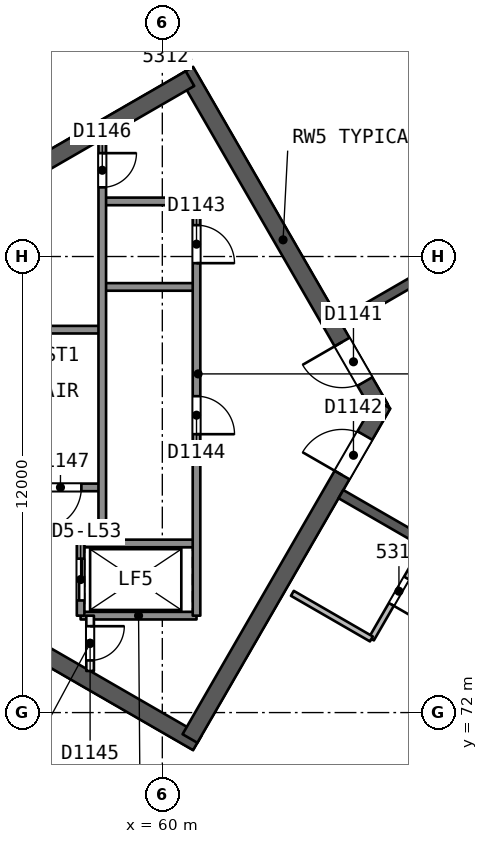
"""IFC4 building model, lengths in metres.
Left out: names, types, materials, properties, quantities, classifications, styles, units other than length and angle.
Written with IfcOpenShell. Run it as: python <this file> out.ifc"""

import sys

from ifc_helpers import new_model, si_unit, direction, frame, frame_2d, origin, place, context, subcontext, project, spatial, rectangle, extrude, element, fill, save


model = new_model("IFC4")
c1 = context("Model", 3, precision=1e-05, world=origin(), true_north=direction((0.0, 1.0)))
c2 = subcontext(c1, "Body", "Model", "MODEL_VIEW")
j1 = project(units=[si_unit("LENGTHUNIT", "METRE"), si_unit("PLANEANGLEUNIT", "RADIAN")], contexts=[c1])
p1 = place(None, origin())
s1 = spatial("IfcSite", under=j1, at=p1, CompositionType="ELEMENT")
p2 = place(p1, origin())
s2 = spatial("IfcBuilding", under=s1, at=p2, CompositionType="ELEMENT")
p3 = place(p2, frame((0.0, 0.0, 216.9)))
s3 = spatial("IfcBuildingStorey", under=s2, at=p3, CompositionType="ELEMENT", Elevation=216.9)
p4 = place(p3, frame((65.74, 80.0, 0.0), z_axis=(0.0, 0.0, 1.0), x_axis=(-0.499991857942, 0.866030104553, 0.0)))
e1 = element("IfcWall", 1, at=p4, inside=s3, PredefinedType="SHEAR", context=c2, shape_type="SweptSolid", body=[
    extrude(rectangle(XDim=10.25, YDim=0.45, at=frame_2d((5.125, 0.0))), origin(), (0.0, 0.0, 1.0), 3.7),
])
p5 = place(p4, frame((0.82, 0.0, 0.0)))
e2 = element("IfcOpeningElement", 2, at=p5, cuts=e1, PredefinedType="OPENING", context=c2, shape_type="SweptSolid", body=[
    extrude(rectangle(XDim=1.2, YDim=2.1, at=frame_2d((0.6, 1.05))), frame((0.0, 0.235, 0.0), z_axis=(0.0, -1.0, 0.0), x_axis=(1.0, 0.0, 0.0)), (0.0, 0.0, 1.0), 0.471),
])
p6 = place(p3, frame((60.728, 88.682, 0.0), z_axis=(0.0, 0.0, 1.0), x_axis=(-0.866021613849, -0.500006564303, 0.0)))
e3 = element("IfcWall", 3, at=p6, inside=s3, PredefinedType="SHEAR", context=c2, shape_type="SweptSolid", body=[
    extrude(rectangle(XDim=14.108, YDim=0.45, at=frame_2d((7.054, 0.0))), origin(), (0.0, 0.0, 1.0), 3.7),
])
p7 = place(p3, frame((48.622, 78.307, 0.0), z_axis=(0.0, 0.0, 1.0), x_axis=(0.86602701116, -0.499997215934, 0.0)))
e4 = element("IfcWall", 4, at=p7, inside=s3, PredefinedType="SHEAR", context=c2, shape_type="SweptSolid", body=[
    extrude(rectangle(XDim=14.204, YDim=0.45, at=frame_2d((7.102, 0.0))), origin(), (0.0, 0.0, 1.0), 3.7),
])
p8 = place(p3, frame((60.728, 71.318, 0.0), z_axis=(0.0, 0.0, 1.0), x_axis=(0.500012416173, 0.866018235185, 0.0)))
e5 = element("IfcWall", 5, at=p8, inside=s3, PredefinedType="SHEAR", context=c2, shape_type="SweptSolid", body=[
    extrude(rectangle(XDim=10.155, YDim=0.45, at=frame_2d((5.078, 0.0))), origin(), (0.0, 0.0, 1.0), 3.7),
])
p9 = place(p8, frame((8.005, 0.0, 0.0)))
e6 = element("IfcOpeningElement", 6, at=p9, cuts=e5, PredefinedType="OPENING", context=c2, shape_type="SweptSolid", body=[
    extrude(rectangle(XDim=1.2, YDim=2.1, at=frame_2d((0.6, 1.05))), frame((0.0, 0.235, 0.0), z_axis=(0.0, -1.0, 0.0), x_axis=(1.0, 0.0, 0.0)), (0.0, 0.0, 1.0), 0.471),
])
p10 = place(p3, frame((78.2, 90.046, 0.0), z_axis=(0.0, 0.0, 1.0), x_axis=(-0.866026492143, -0.499998114903, 0.0)))
e7 = element("IfcWall", 7, at=p10, inside=s3, PredefinedType="SHEAR", context=c2, shape_type="SweptSolid", body=[
    extrude(rectangle(XDim=15.588, YDim=0.25, at=frame_2d((7.794, 0.0))), origin(), (0.0, 0.0, 1.0), 3.3),
])
p11 = place(p10, frame((2.462, 0.0, 0.0)))
e8 = element("IfcOpeningElement", 8, at=p11, cuts=e7, PredefinedType="OPENING", context=c2, shape_type="SweptSolid", body=[
    extrude(rectangle(XDim=1.0, YDim=2.1, at=frame_2d((0.5, 1.05))), frame((0.0, 0.135, 0.0), z_axis=(0.0, -1.0, 0.0), x_axis=(1.0, 0.0, 0.0)), (0.0, 0.0, 1.0), 0.271),
])
p12 = place(p10, frame((8.003, 0.0, 0.0)))
e9 = element("IfcOpeningElement", 9, at=p12, cuts=e7, PredefinedType="OPENING", context=c2, shape_type="SweptSolid", body=[
    extrude(rectangle(XDim=1.1, YDim=2.1, at=frame_2d((0.55, 1.05))), frame((0.0, 0.135, 0.0), z_axis=(0.0, -1.0, 0.0), x_axis=(1.0, 0.0, 0.0)), (0.0, 0.0, 1.0), 0.271),
])
p13 = place(p10, frame((11.971, 0.0, 0.0)))
e10 = element("IfcOpeningElement", 10, at=p13, cuts=e7, PredefinedType="OPENING", context=c2, shape_type="SweptSolid", body=[
    extrude(rectangle(XDim=1.0, YDim=2.1, at=frame_2d((0.5, 1.05))), frame((0.0, 0.135, 0.0), z_axis=(0.0, -1.0, 0.0), x_axis=(1.0, 0.0, 0.0)), (0.0, 0.0, 1.0), 0.271),
])
p14 = place(p3, frame((64.7, 77.748, 0.0), z_axis=(0.0, 0.0, 1.0), x_axis=(0.866026492143, -0.499998114903, 0.0)))
e11 = element("IfcWall", 11, at=p14, inside=s3, PredefinedType="SHEAR", context=c2, shape_type="SweptSolid", body=[
    extrude(rectangle(XDim=15.588, YDim=0.25, at=frame_2d((7.794, 0.0))), origin(), (0.0, 0.0, 1.0), 3.3),
])
p15 = place(p14, frame((3.45, 0.0, 0.0)))
e12 = element("IfcOpeningElement", 12, at=p15, cuts=e11, PredefinedType="OPENING", context=c2, shape_type="SweptSolid", body=[
    extrude(rectangle(XDim=1.0, YDim=2.1, at=frame_2d((0.5, 1.05))), frame((0.0, 0.135, 0.0), z_axis=(0.0, -1.0, 0.0), x_axis=(1.0, 0.0, 0.0)), (0.0, 0.0, 1.0), 0.271),
])
p16 = place(p14, frame((8.003, 0.0, 0.0)))
e13 = element("IfcOpeningElement", 13, at=p16, cuts=e11, PredefinedType="OPENING", context=c2, shape_type="SweptSolid", body=[
    extrude(rectangle(XDim=1.1, YDim=2.1, at=frame_2d((0.55, 1.05))), frame((0.0, 0.135, 0.0), z_axis=(0.0, -1.0, 0.0), x_axis=(1.0, 0.0, 0.0)), (0.0, 0.0, 1.0), 0.271),
])
p17 = place(p14, frame((11.971, 0.0, 0.0)))
e14 = element("IfcOpeningElement", 14, at=p17, cuts=e11, PredefinedType="OPENING", context=c2, shape_type="SweptSolid", body=[
    extrude(rectangle(XDim=1.0, YDim=2.1, at=frame_2d((0.5, 1.05))), frame((0.0, 0.135, 0.0), z_axis=(0.0, -1.0, 0.0), x_axis=(1.0, 0.0, 0.0)), (0.0, 0.0, 1.0), 0.271),
])
p18 = place(p3, frame((64.861, 94.443, 0.0), z_axis=(0.0, 0.0, 1.0), x_axis=(0.500010879287, -0.866019122534, 0.0)))
e15 = element("IfcWall", 15, at=p18, inside=s3, PredefinedType="PARTITIONING", context=c2, shape_type="SweptSolid", body=[
    extrude(rectangle(XDim=10.478, YDim=0.2, at=frame_2d((5.239, 0.0))), origin(), (0.0, 0.0, 1.0), 3.3),
])
p19 = place(p3, frame((59.461, 91.326, 0.0), z_axis=(0.0, 0.0, 1.0), x_axis=(0.499953629774, -0.866052173992, 0.0)))
e16 = element("IfcWall", 16, at=p19, inside=s3, PredefinedType="PARTITIONING", context=c2, shape_type="SweptSolid", body=[
    extrude(rectangle(XDim=2.499, YDim=0.1, at=frame_2d((1.25, 0.0))), origin(), (0.0, 0.0, 1.0), 3.3),
])
p20 = place(p19, frame((0.799, 0.0, 0.0)))
e17 = element("IfcOpeningElement", 17, at=p20, cuts=e16, PredefinedType="OPENING", context=c2, shape_type="SweptSolid", body=[
    extrude(rectangle(XDim=0.9, YDim=2.1, at=frame_2d((0.45, 1.05))), frame((0.0, 0.061, 0.0), z_axis=(0.0, -1.0, 0.0), x_axis=(1.0, 0.0, 0.0)), (0.0, 0.0, 1.0), 0.121),
])
p21 = place(p3, frame((66.952, 76.448, 0.0), z_axis=(0.0, 0.0, 1.0), x_axis=(-0.499987231761, -0.866032775405, 0.0)))
e18 = element("IfcWall", 18, at=p21, inside=s3, PredefinedType="PARTITIONING", context=c2, shape_type="SweptSolid", body=[
    extrude(rectangle(XDim=2.9, YDim=0.15, at=frame_2d((1.45, 0.0))), origin(), (0.0, 0.0, 1.0), 3.3),
])
p22 = place(p21, frame((1.05, 0.0, 0.0)))
e19 = element("IfcOpeningElement", 19, at=p22, cuts=e18, PredefinedType="OPENING", context=c2, shape_type="SweptSolid", body=[
    extrude(rectangle(XDim=0.8, YDim=2.1, at=frame_2d((0.4, 1.05))), frame((0.0, 0.085, 0.0), z_axis=(0.0, -1.0, 0.0), x_axis=(1.0, 0.0, 0.0)), (0.0, 0.0, 1.0), 0.171),
])
p23 = place(p3, frame((65.502, 73.937, 0.0), z_axis=(0.0, 0.0, 1.0), x_axis=(-0.865994240961, 0.500053971709, 0.0)))
e20 = element("IfcWall", 20, at=p23, inside=s3, PredefinedType="PARTITIONING", context=c2, shape_type="SweptSolid", body=[
    extrude(rectangle(XDim=2.401, YDim=0.15, at=frame_2d((1.201, 0.0))), origin(), (0.0, 0.0, 1.0), 3.3),
])
p24 = place(p3, frame((64.051, 66.024, 0.0), z_axis=(0.0, 0.0, 1.0), x_axis=(0.499980616072, 0.866036594811, 0.0)))
e21 = element("IfcWall", 21, at=p24, inside=s3, PredefinedType="PARTITIONING", context=c2, shape_type="SweptSolid", body=[
    extrude(rectangle(XDim=6.931, YDim=0.2, at=frame_2d((3.465, 0.0))), origin(), (0.0, 0.0, 1.0), 3.3),
])
p25 = place(p3, frame((44.063, 82.607, 0.0), z_axis=(0.0, 0.0, 1.0), x_axis=(0.866024402399, 0.500001734447, 0.0)))
e22 = element("IfcWall", 22, at=p25, inside=s3, PredefinedType="SOLIDWALL", context=c2, shape_type="SweptSolid", body=[
    extrude(rectangle(XDim=50.977, YDim=0.3, at=frame_2d((25.488, 0.0))), origin(), (0.0, 0.0, 1.0), 3.3),
])
p26 = place(p25, frame((24.444, 0.0, 0.0)))
e23 = element("IfcOpeningElement", 23, at=p26, cuts=e22, PredefinedType="OPENING", context=c2, shape_type="SweptSolid", body=[
    extrude(rectangle(XDim=2.4, YDim=2.4, at=frame_2d((1.2, 1.2))), frame((0.0, 0.161, 0.0), z_axis=(0.0, -1.0, 0.0), x_axis=(1.0, 0.0, 0.0)), (0.0, 0.0, 1.0), 0.321),
])
p27 = place(p25, frame((29.121, 0.0, 0.0)))
e24 = element("IfcOpeningElement", 24, at=p27, cuts=e22, PredefinedType="OPENING", context=c2, shape_type="SweptSolid", body=[
    extrude(rectangle(XDim=2.4, YDim=2.4, at=frame_2d((1.2, 1.2))), frame((0.0, 0.161, 0.0), z_axis=(0.0, -1.0, 0.0), x_axis=(1.0, 0.0, 0.0)), (0.0, 0.0, 1.0), 0.321),
])
p28 = place(p25, frame((39.656, 0.0, 0.0)))
e25 = element("IfcOpeningElement", 25, at=p28, cuts=e22, PredefinedType="OPENING", context=c2, shape_type="SweptSolid", body=[
    extrude(rectangle(XDim=2.4, YDim=2.4, at=frame_2d((1.2, 1.2))), frame((0.0, 0.161, 0.0), z_axis=(0.0, -1.0, 0.0), x_axis=(1.0, 0.0, 0.0)), (0.0, 0.0, 1.0), 0.321),
])
p29 = place(p25, frame((19.612, 0.0, 0.0)))
e26 = element("IfcOpeningElement", 26, at=p29, cuts=e22, PredefinedType="OPENING", context=c2, shape_type="SweptSolid", body=[
    extrude(rectangle(XDim=2.4, YDim=2.4, at=frame_2d((1.2, 1.2))), frame((0.0, 0.161, 0.0), z_axis=(0.0, -1.0, 0.0), x_axis=(1.0, 0.0, 0.0)), (0.0, 0.0, 1.0), 0.321),
])
p30 = place(p25, frame((8.885, 0.0, 0.0)))
e27 = element("IfcOpeningElement", 27, at=p30, cuts=e22, PredefinedType="OPENING", context=c2, shape_type="SweptSolid", body=[
    extrude(rectangle(XDim=2.4, YDim=2.4, at=frame_2d((1.2, 1.2))), frame((0.0, 0.161, 0.0), z_axis=(0.0, -1.0, 0.0), x_axis=(1.0, 0.0, 0.0)), (0.0, 0.0, 1.0), 0.321),
])
p31 = place(p3, frame((88.21, 51.904, 0.0), z_axis=(0.0, 0.0, 1.0), x_axis=(-0.866024402399, 0.500001734447, 0.0)))
e28 = element("IfcWall", 28, at=p31, inside=s3, PredefinedType="SOLIDWALL", context=c2, shape_type="SweptSolid", body=[
    extrude(rectangle(XDim=50.977, YDim=0.3, at=frame_2d((25.488, 0.0))), origin(), (0.0, 0.0, 1.0), 3.3),
])
p32 = place(p31, frame((24.756, 0.0, 0.0)))
e29 = element("IfcOpeningElement", 29, at=p32, cuts=e28, PredefinedType="OPENING", context=c2, shape_type="SweptSolid", body=[
    extrude(rectangle(XDim=2.4, YDim=2.4, at=frame_2d((1.2, 1.2))), frame((0.0, 0.161, 0.0), z_axis=(0.0, -1.0, 0.0), x_axis=(1.0, 0.0, 0.0)), (0.0, 0.0, 1.0), 0.321),
])
p33 = place(p31, frame((19.612, 0.0, 0.0)))
e30 = element("IfcOpeningElement", 30, at=p33, cuts=e28, PredefinedType="OPENING", context=c2, shape_type="SweptSolid", body=[
    extrude(rectangle(XDim=2.4, YDim=2.4, at=frame_2d((1.2, 1.2))), frame((0.0, 0.161, 0.0), z_axis=(0.0, -1.0, 0.0), x_axis=(1.0, 0.0, 0.0)), (0.0, 0.0, 1.0), 0.321),
])
p34 = place(p31, frame((8.885, 0.0, 0.0)))
e31 = element("IfcOpeningElement", 31, at=p34, cuts=e28, PredefinedType="OPENING", context=c2, shape_type="SweptSolid", body=[
    extrude(rectangle(XDim=2.4, YDim=2.4, at=frame_2d((1.2, 1.2))), frame((0.0, 0.161, 0.0), z_axis=(0.0, -1.0, 0.0), x_axis=(1.0, 0.0, 0.0)), (0.0, 0.0, 1.0), 0.321),
])
p35 = place(p31, frame((38.323, 0.0, 0.0)))
e32 = element("IfcOpeningElement", 32, at=p35, cuts=e28, PredefinedType="OPENING", context=c2, shape_type="SweptSolid", body=[
    extrude(rectangle(XDim=2.4, YDim=2.4, at=frame_2d((1.2, 1.2))), frame((0.0, 0.161, 0.0), z_axis=(0.0, -1.0, 0.0), x_axis=(1.0, 0.0, 0.0)), (0.0, 0.0, 1.0), 0.321),
])
for number, where, z_axis, x_axis in (
    (33, (60.9, 85.45, 0.0), (0.0, 0.0, 1.0), (-1.0, 0.0, 0.0)),
    (34, (60.9, 83.2, 0.0), (0.0, 0.0, 1.0), (-1.0, 0.0, 0.0)),
):
    element("IfcWall", number, at=place(p3, frame(where, z_axis=z_axis, x_axis=x_axis)), inside=s3, PredefinedType="SOLIDWALL", context=c2, shape_type="SweptSolid", body=[
        extrude(rectangle(XDim=2.48, YDim=0.2, at=frame_2d((1.24, 0.0))), origin(), (0.0, 0.0, 1.0), 3.3),
    ])
p36 = place(p3, frame((58.42, 82.075, 0.0), z_axis=(0.0, 0.0, 1.0), x_axis=(-1.0, 0.0, 0.0)))
e35 = element("IfcWall", 35, at=p36, inside=s3, PredefinedType="SOLIDWALL", context=c2, shape_type="SweptSolid", body=[
    extrude(rectangle(XDim=7.7, YDim=0.2, at=frame_2d((3.85, 0.0))), origin(), (0.0, 0.0, 1.0), 3.3),
])
p37 = place(p3, frame((58.42, 77.925, 0.0), z_axis=(0.0, 0.0, 1.0), x_axis=(-1.0, 0.0, 0.0)))
e36 = element("IfcWall", 36, at=p37, inside=s3, PredefinedType="SOLIDWALL", context=c2, shape_type="SweptSolid", body=[
    extrude(rectangle(XDim=7.7, YDim=0.2, at=frame_2d((3.85, 0.0))), origin(), (0.0, 0.0, 1.0), 3.3),
])
p38 = place(p37, frame((0.55, 0.0, 0.0)))
e37 = element("IfcOpeningElement", 37, at=p38, cuts=e36, PredefinedType="OPENING", context=c2, shape_type="SweptSolid", body=[
    extrude(rectangle(XDim=1.1, YDim=2.1, at=frame_2d((0.55, 1.05))), frame((0.0, 0.11, 0.0), z_axis=(0.0, -1.0, 0.0), x_axis=(1.0, 0.0, 0.0)), (0.0, 0.0, 1.0), 0.221),
])
for number, where, z_axis, x_axis in (
    (38, (60.9, 76.45, 0.0), (0.0, 0.0, 1.0), (-1.0, 0.0, 0.0)),
    (39, (60.9, 74.55, 0.0), (0.0, 0.0, 1.0), (-1.0, 0.0, 0.0)),
):
    element("IfcWall", number, at=place(p3, frame(where, z_axis=z_axis, x_axis=x_axis)), inside=s3, PredefinedType="SOLIDWALL", context=c2, shape_type="SweptSolid", body=[
        extrude(rectangle(XDim=3.05, YDim=0.2, at=frame_2d((1.525, 0.0))), origin(), (0.0, 0.0, 1.0), 3.3),
    ])
p39 = place(p3, frame((60.9, 85.45, 0.0), z_axis=(0.0, 0.0, 1.0), x_axis=(0.0, -1.0, 0.0)))
e40 = element("IfcWall", 40, at=p39, inside=s3, PredefinedType="SOLIDWALL", context=c2, shape_type="SweptSolid", body=[
    extrude(rectangle(XDim=10.9, YDim=0.2, at=frame_2d((5.45, 0.0))), origin(), (0.0, 0.0, 1.0), 3.3),
])
p40 = place(p39, frame((0.625, 0.0, 0.0)))
e41 = element("IfcOpeningElement", 41, at=p40, cuts=e40, PredefinedType="OPENING", context=c2, shape_type="SweptSolid", body=[
    extrude(rectangle(XDim=1.0, YDim=2.1, at=frame_2d((0.5, 1.05))), frame((0.0, 0.11, 0.0), z_axis=(0.0, -1.0, 0.0), x_axis=(1.0, 0.0, 0.0)), (0.0, 0.0, 1.0), 0.221),
])
p41 = place(p39, frame((5.125, 0.0, 0.0)))
e42 = element("IfcOpeningElement", 42, at=p41, cuts=e40, PredefinedType="OPENING", context=c2, shape_type="SweptSolid", body=[
    extrude(rectangle(XDim=1.0, YDim=2.1, at=frame_2d((0.5, 1.05))), frame((0.0, 0.11, 0.0), z_axis=(0.0, -1.0, 0.0), x_axis=(1.0, 0.0, 0.0)), (0.0, 0.0, 1.0), 0.221),
])
p42 = place(p3, frame((58.42, 87.09, 0.0), z_axis=(0.0, 0.0, 1.0), x_axis=(0.0, -1.0, 0.0)))
e43 = element("IfcWall", 43, at=p42, inside=s3, PredefinedType="SOLIDWALL", context=c2, shape_type="SweptSolid", body=[
    extrude(rectangle(XDim=10.64, YDim=0.2, at=frame_2d((5.32, 0.0))), origin(), (0.0, 0.0, 1.0), 3.3),
])
p43 = place(p42, frame((0.37, 0.0, 0.0)))
e44 = element("IfcOpeningElement", 44, at=p43, cuts=e43, PredefinedType="OPENING", context=c2, shape_type="SweptSolid", body=[
    extrude(rectangle(XDim=0.9, YDim=2.1, at=frame_2d((0.45, 1.05))), frame((0.0, 0.11, 0.0), z_axis=(0.0, -1.0, 0.0), x_axis=(1.0, 0.0, 0.0)), (0.0, 0.0, 1.0), 0.221),
])
p44 = place(p3, frame((58.1, 74.55, 0.0), z_axis=(0.0, 0.0, 1.0), x_axis=(0.0, -1.0, 0.0)))
e45 = element("IfcWall", 45, at=p44, inside=s3, PredefinedType="PARTITIONING", context=c2, shape_type="SweptSolid", body=[
    extrude(rectangle(XDim=1.455, YDim=0.2, at=frame_2d((0.728, 0.0))), origin(), (0.0, 0.0, 1.0), 3.3),
])
p45 = place(p44, frame((0.278, 0.0, 0.0)))
e46 = element("IfcOpeningElement", 46, at=p45, cuts=e45, PredefinedType="OPENING", context=c2, shape_type="SweptSolid", body=[
    extrude(rectangle(XDim=0.9, YDim=2.1, at=frame_2d((0.45, 1.05))), frame((0.0, 0.11, 0.0), z_axis=(0.0, -1.0, 0.0), x_axis=(1.0, 0.0, 0.0)), (0.0, 0.0, 1.0), 0.221),
])
p46 = place(p3, frame((57.85, 76.45, 0.0), z_axis=(0.0, 0.0, 1.0), x_axis=(0.0, -1.0, 0.0)))
e47 = element("IfcWall", 47, at=p46, inside=s3, PredefinedType="SOLIDWALL", context=c2, shape_type="SweptSolid", body=[
    extrude(rectangle(XDim=1.9, YDim=0.2, at=frame_2d((0.95, 0.0))), origin(), (0.0, 0.0, 1.0), 3.3),
])
p47 = place(p46, frame((0.4, 0.0, 0.0)))
e48 = element("IfcOpeningElement", 48, at=p47, cuts=e47, PredefinedType="OPENING", context=c2, shape_type="SweptSolid", body=[
    extrude(rectangle(XDim=1.1, YDim=2.1, at=frame_2d((0.55, 1.05))), frame((0.0, 0.11, 0.0), z_axis=(0.0, -1.0, 0.0), x_axis=(1.0, 0.0, 0.0)), (0.0, 0.0, 1.0), 0.221),
])
p48 = place(p22, origin())
e49 = element("IfcDoor", 49, at=p48, inside=s3, OperationType="SINGLE_SWING_RIGHT", PredefinedType="NOTDEFINED", context=c2, shape_type="SweptSolid", body=[
    extrude(rectangle(XDim=0.8, YDim=2.1, at=frame_2d((0.4, 1.05))), frame((0.0, 0.025, 0.0), z_axis=(0.0, -1.0, 0.0), x_axis=(1.0, 0.0, 0.0)), (0.0, 0.0, 1.0), 0.05),
])
fill(e19, e49)
p49 = place(p5, origin())
e50 = element("IfcDoor", 50, at=p49, inside=s3, OperationType="SINGLE_SWING_RIGHT", PredefinedType="NOTDEFINED", context=c2, shape_type="SweptSolid", body=[
    extrude(rectangle(XDim=1.2, YDim=2.1, at=frame_2d((0.6, 1.05))), frame((0.0, 0.025, 0.0), z_axis=(0.0, -1.0, 0.0), x_axis=(1.0, 0.0, 0.0)), (0.0, 0.0, 1.0), 0.05),
])
fill(e2, e50)
p50 = place(p9, origin())
e51 = element("IfcDoor", 51, at=p50, inside=s3, OperationType="SINGLE_SWING_LEFT", PredefinedType="NOTDEFINED", context=c2, shape_type="SweptSolid", body=[
    extrude(rectangle(XDim=1.2, YDim=2.1, at=frame_2d((0.6, 1.05))), frame((0.0, 0.025, 0.0), z_axis=(0.0, -1.0, 0.0), x_axis=(1.0, 0.0, 0.0)), (0.0, 0.0, 1.0), 0.05),
])
fill(e6, e51)
p51 = place(p47, origin())
e52 = element("IfcDoor", 52, at=p51, inside=s3, OperationType="SLIDING_TO_RIGHT", PredefinedType="NOTDEFINED", context=c2, shape_type="SweptSolid", body=[
    extrude(rectangle(XDim=1.1, YDim=2.1, at=frame_2d((0.55, 1.05))), frame((0.0, 0.025, 0.0), z_axis=(0.0, -1.0, 0.0), x_axis=(1.0, 0.0, 0.0)), (0.0, 0.0, 1.0), 0.05),
])
fill(e48, e52)
p52 = place(p40, origin())
e53 = element("IfcDoor", 53, at=p52, inside=s3, OperationType="SINGLE_SWING_RIGHT", PredefinedType="NOTDEFINED", context=c2, shape_type="SweptSolid", body=[
    extrude(rectangle(XDim=1.0, YDim=2.1, at=frame_2d((0.5, 1.05))), frame((0.0, 0.025, 0.0), z_axis=(0.0, -1.0, 0.0), x_axis=(1.0, 0.0, 0.0)), (0.0, 0.0, 1.0), 0.05),
])
fill(e41, e53)
p53 = place(p41, origin())
e54 = element("IfcDoor", 54, at=p53, inside=s3, OperationType="SINGLE_SWING_RIGHT", PredefinedType="NOTDEFINED", context=c2, shape_type="SweptSolid", body=[
    extrude(rectangle(XDim=1.0, YDim=2.1, at=frame_2d((0.5, 1.05))), frame((0.0, 0.025, 0.0), z_axis=(0.0, -1.0, 0.0), x_axis=(1.0, 0.0, 0.0)), (0.0, 0.0, 1.0), 0.05),
])
fill(e42, e54)
p54 = place(p45, origin())
e55 = element("IfcDoor", 55, at=p54, inside=s3, OperationType="SINGLE_SWING_LEFT", PredefinedType="NOTDEFINED", context=c2, shape_type="SweptSolid", body=[
    extrude(rectangle(XDim=0.9, YDim=2.1, at=frame_2d((0.45, 1.05))), frame((0.0, 0.025, 0.0), z_axis=(0.0, -1.0, 0.0), x_axis=(1.0, 0.0, 0.0)), (0.0, 0.0, 1.0), 0.05),
])
fill(e46, e55)
p55 = place(p43, origin())
e56 = element("IfcDoor", 56, at=p55, inside=s3, OperationType="SINGLE_SWING_LEFT", PredefinedType="NOTDEFINED", context=c2, shape_type="SweptSolid", body=[
    extrude(rectangle(XDim=0.9, YDim=2.1, at=frame_2d((0.45, 1.05))), frame((0.0, 0.025, 0.0), z_axis=(0.0, -1.0, 0.0), x_axis=(1.0, 0.0, 0.0)), (0.0, 0.0, 1.0), 0.05),
])
fill(e44, e56)
p56 = place(p38, origin())
e57 = element("IfcDoor", 57, at=p56, inside=s3, OperationType="SINGLE_SWING_RIGHT", PredefinedType="NOTDEFINED", context=c2, shape_type="SweptSolid", body=[
    extrude(rectangle(XDim=1.1, YDim=2.1, at=frame_2d((0.55, 1.05))), frame((0.0, 0.025, 0.0), z_axis=(0.0, -1.0, 0.0), x_axis=(1.0, 0.0, 0.0)), (0.0, 0.0, 1.0), 0.05),
])
fill(e37, e57)
save(model, sys.argv[1])
